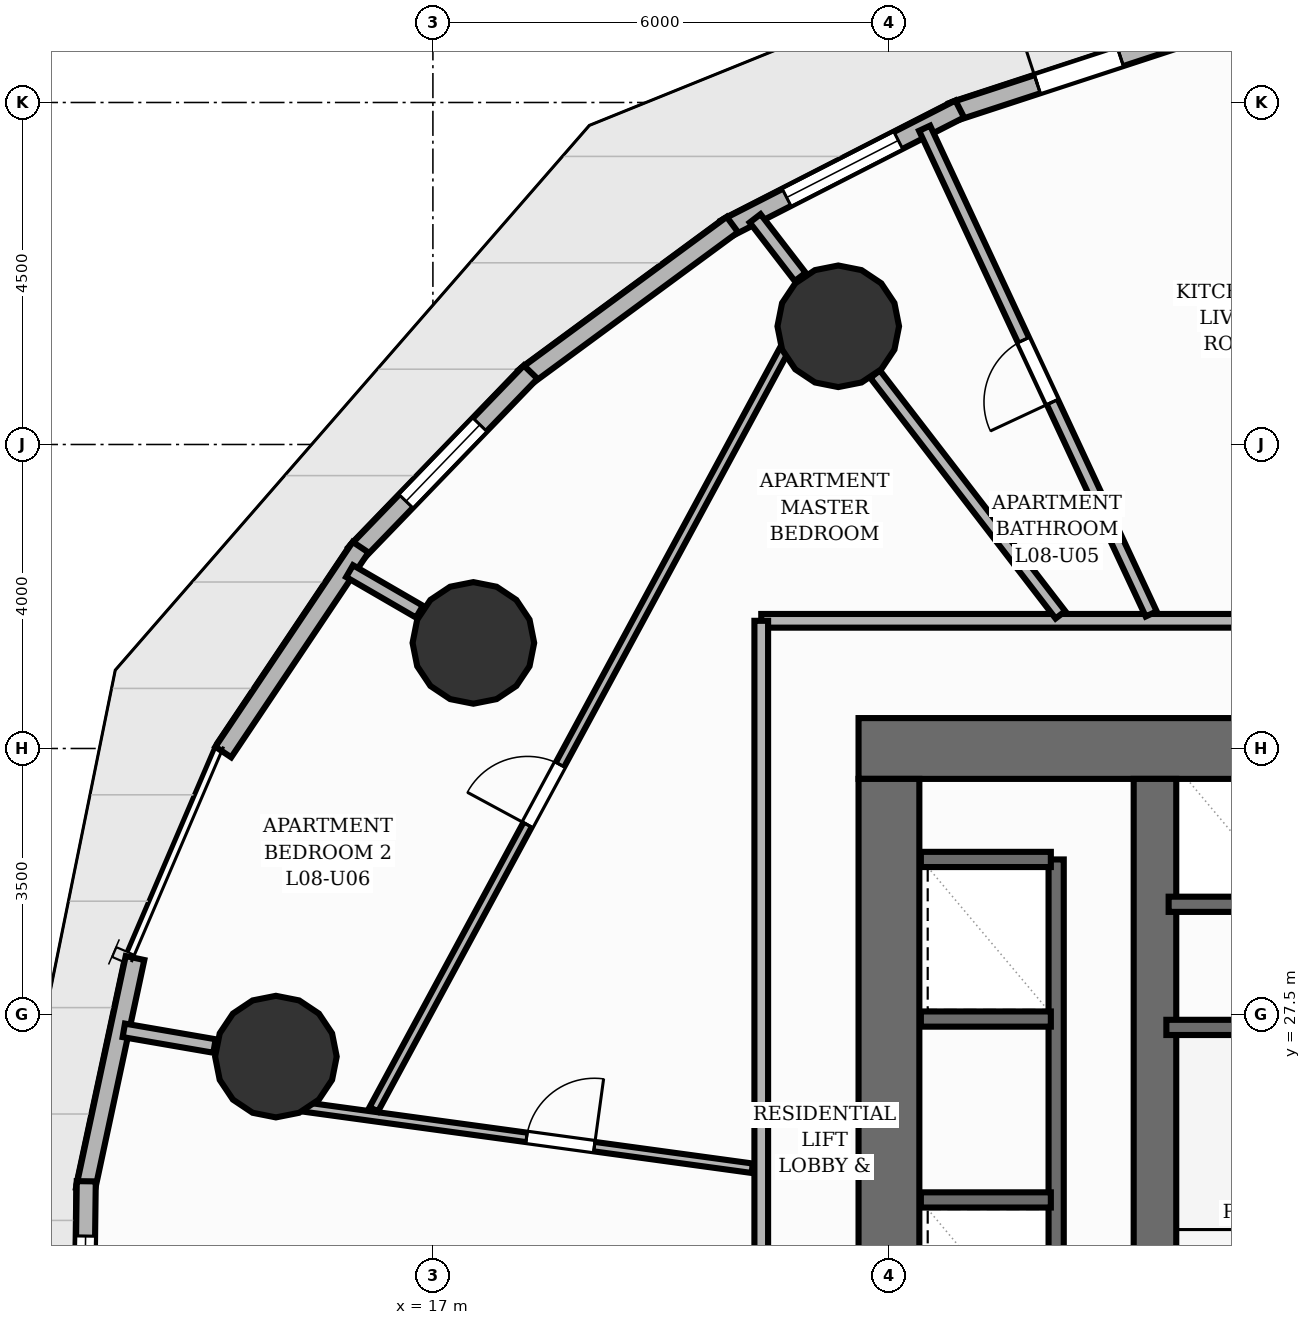
"""IFC4 building model, lengths in metres.
Left out: names, types, materials, properties, quantities, classifications, styles, units other than length and angle.
Written with IfcOpenShell. Run it as: python <this file> out.ifc"""

import sys

from ifc_helpers import new_model, si_unit, direction, frame, frame_2d, origin, origin_2d, place, context, subcontext, project, spatial, rectangle, circle, extrude, element, fill, save


model = new_model("IFC4")
c1 = context("Model", 3, precision=1e-05, world=origin(), true_north=direction((0.0, 1.0)))
c2 = subcontext(c1, "Body", "Model", "MODEL_VIEW")
j1 = project(units=[si_unit("LENGTHUNIT", "METRE"), si_unit("PLANEANGLEUNIT", "RADIAN")], contexts=[c1])
p1 = place(None, origin())
s1 = spatial("IfcSite", under=j1, at=p1, CompositionType="ELEMENT")
p2 = place(p1, origin())
s2 = spatial("IfcBuilding", under=s1, at=p2, CompositionType="ELEMENT")
p3 = place(p2, frame((0.0, 0.0, 31.2)))
s3 = spatial("IfcBuildingStorey", under=s2, at=p3, CompositionType="ELEMENT", Elevation=31.2)
p4 = place(p3, frame((22.6, 31.0, 0.0), z_axis=(0.0, 0.0, 1.0), x_axis=(1.0, 0.0, 0.0)))
e1 = element("IfcWall", 1, at=p4, inside=s3, PredefinedType="SHEAR", context=c2, shape_type="SweptSolid", body=[
    extrude(rectangle(XDim=18.8, YDim=0.8, at=frame_2d((9.4, 0.0))), origin(), (0.0, 0.0, 1.0), 3.2),
])
p5 = place(p4, frame((11.8, 0.0, 0.0)))
e2 = element("IfcOpeningElement", 2, at=p5, cuts=e1, PredefinedType="OPENING", context=c2, shape_type="SweptSolid", body=[
    extrude(rectangle(XDim=1.1, YDim=2.15, at=frame_2d((0.55, 1.075))), frame((0.0, 0.41, 0.0), z_axis=(0.0, -1.0, 0.0), x_axis=(1.0, 0.0, 0.0)), (0.0, 0.0, 1.0), 0.82),
])
p6 = place(p3, frame((23.0, 17.4, 0.0), z_axis=(0.0, 0.0, 1.0), x_axis=(0.0, 1.0, 0.0)))
e3 = element("IfcWall", 3, at=p6, inside=s3, PredefinedType="SHEAR", context=c2, shape_type="SweptSolid", body=[
    extrude(rectangle(XDim=13.2, YDim=0.8, at=frame_2d((6.6, 0.0))), origin(), (0.0, 0.0, 1.0), 3.2),
])
p7 = place(p3, frame((26.5, 17.4, 0.0), z_axis=(0.0, 0.0, 1.0), x_axis=(0.0, 1.0, 0.0)))
e4 = element("IfcWall", 4, at=p7, inside=s3, PredefinedType="SHEAR", context=c2, shape_type="SweptSolid", body=[
    extrude(rectangle(XDim=13.2, YDim=0.56, at=frame_2d((6.6, 0.0))), origin(), (0.0, 0.0, 1.0), 3.2),
])
for number, where, z_axis, x_axis in (
    (5, (22.333, 36.555, 0.0), (0.0, 0.0, 1.0), (1.0, 0.0, 0.0)),
    (6, (17.532, 32.389, 0.0), (0.0, 0.0, 1.0), (1.0, 0.0, 0.0)),
    (7, (14.934, 26.946, 0.0), (0.0, 0.0, 1.0), (1.0, 0.0, 0.0)),
):
    element("IfcColumn", number, at=place(p3, frame(where, z_axis=z_axis, x_axis=x_axis)), inside=s3, PredefinedType="COLUMN", context=c2, shape_type="SweptSolid", body=[
        extrude(circle(Radius=0.8, at=origin_2d()), origin(), (0.0, 0.0, 1.0), 3.2),
    ])
p8 = place(p3, frame((23.831, 39.373, 0.0), z_axis=(0.0, 0.0, 1.0), x_axis=(0.950290237418, 0.311365484066, 0.0)))
e8 = element("IfcWall", 8, at=p8, inside=s3, PredefinedType="SOLIDWALL", context=c2, shape_type="SweptSolid", body=[
    extrude(rectangle(XDim=3.513, YDim=0.25, at=frame_2d((1.756, 0.0))), origin(), (0.0, 0.0, 1.0), 2.96),
])
p9 = place(p8, frame((1.181, 0.0, 0.0)))
e9 = element("IfcOpeningElement", 9, at=p9, cuts=e8, PredefinedType="OPENING", context=c2, shape_type="SweptSolid", body=[
    extrude(rectangle(XDim=1.15, YDim=2.2, at=frame_2d((0.575, 1.1))), frame((0.0, 0.135, 0.0), z_axis=(0.0, -1.0, 0.0), x_axis=(1.0, 0.0, 0.0)), (0.0, 0.0, 1.0), 0.27),
])
p10 = place(p3, frame((20.847, 37.836, 0.0), z_axis=(0.0, 0.0, 1.0), x_axis=(0.890260122421, 0.455452428281, 0.0)))
e10 = element("IfcWall", 10, at=p10, inside=s3, PredefinedType="SOLIDWALL", context=c2, shape_type="SweptSolid", body=[
    extrude(rectangle(XDim=3.465, YDim=0.25, at=frame_2d((1.732, 0.0))), origin(), (0.0, 0.0, 1.0), 2.96),
])
p11 = place(p10, frame((0.907, 0.0, 0.85)))
e11 = element("IfcOpeningElement", 11, at=p11, cuts=e10, PredefinedType="OPENING", context=c2, shape_type="SweptSolid", body=[
    extrude(rectangle(XDim=1.65, YDim=1.55, at=frame_2d((0.825, 0.775))), frame((0.0, 0.135, 0.0), z_axis=(0.0, -1.0, 0.0), x_axis=(1.0, 0.0, 0.0)), (0.0, 0.0, 1.0), 0.27),
])
p12 = place(p3, frame((18.202, 35.88, 0.0), z_axis=(0.0, 0.0, 1.0), x_axis=(0.805405938507, 0.592723606935, 0.0)))
e12 = element("IfcWall", 12, at=p12, inside=s3, PredefinedType="SOLIDWALL", context=c2, shape_type="SweptSolid", body=[
    extrude(rectangle(XDim=3.399, YDim=0.25, at=frame_2d((1.699, 0.0))), origin(), (0.0, 0.0, 1.0), 2.96),
])
p13 = place(p3, frame((15.979, 33.562, 0.0), z_axis=(0.0, 0.0, 1.0), x_axis=(0.694392538781, 0.719596416115, 0.0)))
e13 = element("IfcWall", 13, at=p13, inside=s3, PredefinedType="SOLIDWALL", context=c2, shape_type="SweptSolid", body=[
    extrude(rectangle(XDim=3.323, YDim=0.25, at=frame_2d((1.661, 0.0))), origin(), (0.0, 0.0, 1.0), 2.96),
])
p14 = place(p13, frame((0.961, 0.0, 0.85)))
e14 = element("IfcOpeningElement", 14, at=p14, cuts=e13, PredefinedType="OPENING", context=c2, shape_type="SweptSolid", body=[
    extrude(rectangle(XDim=1.4, YDim=1.55, at=frame_2d((0.7, 0.775))), frame((0.0, 0.135, 0.0), z_axis=(0.0, -1.0, 0.0), x_axis=(1.0, 0.0, 0.0)), (0.0, 0.0, 1.0), 0.27),
])
p15 = place(p3, frame((14.242, 30.953, 0.0), z_axis=(0.0, 0.0, 1.0), x_axis=(0.556764929833, 0.83067009872, 0.0)))
e15 = element("IfcWall", 15, at=p15, inside=s3, PredefinedType="SOLIDWALL", context=c2, shape_type="SweptSolid", body=[
    extrude(rectangle(XDim=3.244, YDim=0.25, at=frame_2d((1.622, 0.0))), origin(), (0.0, 0.0, 1.0), 2.96),
])
p16 = place(p3, frame((12.427, 25.192, 0.0), z_axis=(0.0, 0.0, 1.0), x_axis=(0.209668000253, 0.977772637002, 0.0)))
e16 = element("IfcWall", 16, at=p16, inside=s3, PredefinedType="SOLIDWALL", context=c2, shape_type="SweptSolid", body=[
    extrude(rectangle(XDim=3.121, YDim=0.25, at=frame_2d((1.56, 0.0))), origin(), (0.0, 0.0, 1.0), 2.96),
])
p17 = place(p3, frame((12.401, 22.214, 0.0), z_axis=(0.0, 0.0, 1.0), x_axis=(0.012397373015, 0.999923149618, 0.0)))
e17 = element("IfcWall", 17, at=p17, inside=s3, PredefinedType="SOLIDWALL", context=c2, shape_type="SweptSolid", body=[
    extrude(rectangle(XDim=3.092, YDim=0.25, at=frame_2d((1.546, 0.0))), origin(), (0.0, 0.0, 1.0), 2.96),
])
p18 = place(p17, frame((0.721, 0.0, 0.85)))
e18 = element("IfcOpeningElement", 18, at=p18, cuts=e17, PredefinedType="OPENING", context=c2, shape_type="SweptSolid", body=[
    extrude(rectangle(XDim=1.65, YDim=1.55, at=frame_2d((0.825, 0.775))), frame((0.0, 0.135, 0.0), z_axis=(0.0, -1.0, 0.0), x_axis=(1.0, 0.0, 0.0)), (0.0, 0.0, 1.0), 0.27),
])
p19 = place(p3, frame((26.65, 27.33, 0.0), z_axis=(0.0, 0.0, 1.0), x_axis=(1.0, 0.0, 0.0)))
e19 = element("IfcWall", 19, at=p19, inside=s3, PredefinedType="SHEAR", context=c2, shape_type="SweptSolid", body=[
    extrude(rectangle(XDim=3.24, YDim=0.2, at=frame_2d((1.62, 0.0))), origin(), (0.0, 0.0, 1.0), 3.2),
])
p20 = place(p3, frame((25.2, 18.46, 0.0), z_axis=(0.0, 0.0, 1.0), x_axis=(0.0, 1.0, 0.0)))
e20 = element("IfcWall", 20, at=p20, inside=s3, PredefinedType="SHEAR", context=c2, shape_type="SweptSolid", body=[
    extrude(rectangle(XDim=11.08, YDim=0.2, at=frame_2d((5.54, 0.0))), origin(), (0.0, 0.0, 1.0), 3.2),
])
for number, where, z_axis, x_axis in (
    (21, (23.42, 29.54, 0.0), (0.0, 0.0, 1.0), (1.0, 0.0, 0.0)),
    (22, (23.42, 25.06, 0.0), (0.0, 0.0, 1.0), (1.0, 0.0, 0.0)),
    (23, (23.42, 27.44, 0.0), (0.0, 0.0, 1.0), (1.0, 0.0, 0.0)),
):
    element("IfcWall", number, at=place(p3, frame(where, z_axis=z_axis, x_axis=x_axis)), inside=s3, PredefinedType="SHEAR", context=c2, shape_type="SweptSolid", body=[
        extrude(rectangle(XDim=1.71, YDim=0.2, at=frame_2d((0.855, 0.0))), origin(), (0.0, 0.0, 1.0), 3.2),
    ])
p21 = place(p3, frame((26.68, 28.95, 0.0), z_axis=(0.0, 0.0, 1.0), x_axis=(1.0, 0.0, 0.0)))
e24 = element("IfcWall", 24, at=p21, inside=s3, PredefinedType="SHEAR", context=c2, shape_type="SweptSolid", body=[
    extrude(rectangle(XDim=5.24, YDim=0.2, at=frame_2d((2.62, 0.0))), origin(), (0.0, 0.0, 1.0), 3.2),
])
p22 = place(p3, frame((21.833, 37.205, 0.0), z_axis=(0.0, 0.0, 1.0), x_axis=(-0.609953343804, 0.792437327732, 0.0)))
e25 = element("IfcWall", 25, at=p22, inside=s3, PredefinedType="PARTITIONING", context=c2, shape_type="SweptSolid", body=[
    extrude(rectangle(XDim=0.973, YDim=0.18, at=frame_2d((0.486, 0.0))), origin(), (0.0, 0.0, 1.0), 2.178),
])
p23 = place(p3, frame((16.823, 32.8, 0.0), z_axis=(0.0, 0.0, 1.0), x_axis=(-0.865001274409, 0.501769663562, 0.0)))
e26 = element("IfcWall", 26, at=p23, inside=s3, PredefinedType="PARTITIONING", context=c2, shape_type="SweptSolid", body=[
    extrude(rectangle(XDim=1.063, YDim=0.18, at=frame_2d((0.531, 0.0))), origin(), (0.0, 0.0, 1.0), 2.178),
])
p24 = place(p3, frame((14.126, 27.085, 0.0), z_axis=(0.0, 0.0, 1.0), x_axis=(-0.985412344637, 0.170183756676, 0.0)))
e27 = element("IfcWall", 27, at=p24, inside=s3, PredefinedType="PARTITIONING", context=c2, shape_type="SweptSolid", body=[
    extrude(rectangle(XDim=1.211, YDim=0.18, at=frame_2d((0.605, 0.0))), origin(), (0.0, 0.0, 1.0), 2.178),
])
p25 = place(p3, frame((21.32, 32.68, 0.0), z_axis=(0.0, 0.0, 1.0), x_axis=(1.0, 0.0, 0.0)))
e28 = element("IfcWall", 28, at=p25, inside=s3, PredefinedType="PARTITIONING", context=c2, shape_type="SweptSolid", body=[
    extrude(rectangle(XDim=8.823, YDim=0.18, at=frame_2d((4.411, 0.0))), origin(), (0.0, 0.0, 1.0), 2.955),
])
p26 = place(p25, frame((6.462, 0.0, 0.0)))
e29 = element("IfcOpeningElement", 29, at=p26, cuts=e28, PredefinedType="OPENING", context=c2, shape_type="SweptSolid", body=[
    extrude(rectangle(XDim=1.05, YDim=2.15, at=frame_2d((0.525, 1.075))), frame((0.0, 0.1, 0.0), z_axis=(0.0, -1.0, 0.0), x_axis=(1.0, 0.0, 0.0)), (0.0, 0.0, 1.0), 0.2),
])
p27 = place(p3, frame((21.32, 22.09, 0.0), z_axis=(0.0, 0.0, 1.0), x_axis=(0.0, 1.0, 0.0)))
e30 = element("IfcWall", 30, at=p27, inside=s3, PredefinedType="PARTITIONING", context=c2, shape_type="SweptSolid", body=[
    extrude(rectangle(XDim=10.59, YDim=0.18, at=frame_2d((5.295, 0.0))), origin(), (0.0, 0.0, 1.0), 2.955),
])
p28 = place(p27, frame((1.17, 0.0, 0.0)))
e31 = element("IfcOpeningElement", 31, at=p28, cuts=e30, PredefinedType="OPENING", context=c2, shape_type="SweptSolid", body=[
    extrude(rectangle(XDim=1.05, YDim=2.15, at=frame_2d((0.525, 1.075))), frame((0.0, 0.1, 0.0), z_axis=(0.0, -1.0, 0.0), x_axis=(1.0, 0.0, 0.0)), (0.0, 0.0, 1.0), 0.2),
])
p29 = place(p3, frame((26.45, 32.771, 0.0), z_axis=(0.0, 0.0, 1.0), x_axis=(-0.422745211231, 0.906248578692, 0.0)))
e32 = element("IfcWall", 32, at=p29, inside=s3, PredefinedType="PLUMBINGWALL", context=c2, shape_type="SweptSolid", body=[
    extrude(rectangle(XDim=7.052, YDim=0.16, at=frame_2d((3.526, 0.0))), origin(), (0.0, 0.0, 1.0), 2.641),
])
p30 = place(p29, frame((3.076, 0.0, 0.0)))
e33 = element("IfcOpeningElement", 33, at=p30, cuts=e32, PredefinedType="OPENING", context=c2, shape_type="SweptSolid", body=[
    extrude(rectangle(XDim=0.9, YDim=2.1, at=frame_2d((0.45, 1.05))), frame((0.0, 0.09, 0.0), z_axis=(0.0, -1.0, 0.0), x_axis=(1.0, 0.0, 0.0)), (0.0, 0.0, 1.0), 0.18),
])
p31 = place(p3, frame((25.256, 32.759, 0.0), z_axis=(0.0, 0.0, 1.0), x_axis=(-0.610097434882, 0.792326397358, 0.0)))
e34 = element("IfcWall", 34, at=p31, inside=s3, PredefinedType="PLUMBINGWALL", context=c2, shape_type="SweptSolid", body=[
    extrude(rectangle(XDim=3.997, YDim=0.16, at=frame_2d((1.998, 0.0))), origin(), (0.0, 0.0, 1.0), 2.178),
])
p32 = place(p3, frame((15.33, 26.28, 0.0), z_axis=(0.0, 0.0, 1.0), x_axis=(0.990775681502, -0.135512172681, 0.0)))
e35 = element("IfcWall", 35, at=p32, inside=s3, PredefinedType="PARTITIONING", context=c2, shape_type="SweptSolid", body=[
    extrude(rectangle(XDim=5.926, YDim=0.125, at=frame_2d((2.963, 0.0))), origin(), (0.0, 0.0, 1.0), 2.955),
])
p33 = place(p32, frame((2.929, 0.0, 0.0)))
e36 = element("IfcOpeningElement", 36, at=p33, cuts=e35, PredefinedType="OPENING", context=c2, shape_type="SweptSolid", body=[
    extrude(rectangle(XDim=0.9, YDim=2.1, at=frame_2d((0.45, 1.05))), frame((0.0, 0.073, 0.0), z_axis=(0.0, -1.0, 0.0), x_axis=(1.0, 0.0, 0.0)), (0.0, 0.0, 1.0), 0.145),
])
p34 = place(p3, frame((16.222, 26.252, 0.0), z_axis=(0.0, 0.0, 1.0), x_axis=(0.475374660533, 0.879783457519, 0.0)))
e37 = element("IfcWall", 37, at=p34, inside=s3, PredefinedType="PARTITIONING", context=c2, shape_type="SweptSolid", body=[
    extrude(rectangle(XDim=11.37, YDim=0.125, at=frame_2d((5.685, 0.0))), origin(), (0.0, 0.0, 1.0), 2.328),
])
p35 = place(p34, frame((4.255, 0.0, 0.0)))
e38 = element("IfcOpeningElement", 38, at=p35, cuts=e37, PredefinedType="OPENING", context=c2, shape_type="SweptSolid", body=[
    extrude(rectangle(XDim=0.9, YDim=2.1, at=frame_2d((0.45, 1.05))), frame((0.0, 0.073, 0.0), z_axis=(0.0, -1.0, 0.0), x_axis=(1.0, 0.0, 0.0)), (0.0, 0.0, 1.0), 0.145),
])
p36 = place(p9, origin())
e39 = element("IfcDoor", 39, at=p36, inside=s3, OperationType="SINGLE_SWING_LEFT", PredefinedType="DOOR", context=c2, shape_type="SweptSolid", body=[
    extrude(rectangle(XDim=1.15, YDim=2.2, at=frame_2d((0.575, 1.1))), frame((0.0, 0.025, 0.0), z_axis=(0.0, -1.0, 0.0), x_axis=(1.0, 0.0, 0.0)), (0.0, 0.0, 1.0), 0.05),
])
fill(e9, e39)
p37 = place(p11, origin())
e40 = element("IfcWindow", 40, at=p37, inside=s3, PartitioningType="SINGLE_PANEL", PredefinedType="WINDOW", context=c2, shape_type="SweptSolid", body=[
    extrude(rectangle(XDim=1.65, YDim=1.55, at=frame_2d((0.825, 0.775))), frame((0.0, 0.03, 0.0), z_axis=(0.0, -1.0, 0.0), x_axis=(1.0, 0.0, 0.0)), (0.0, 0.0, 1.0), 0.06),
])
fill(e11, e40)
p38 = place(p14, origin())
e41 = element("IfcWindow", 41, at=p38, inside=s3, PartitioningType="SINGLE_PANEL", PredefinedType="WINDOW", context=c2, shape_type="SweptSolid", body=[
    extrude(rectangle(XDim=1.4, YDim=1.55, at=frame_2d((0.7, 0.775))), frame((0.0, 0.03, 0.0), z_axis=(0.0, -1.0, 0.0), x_axis=(1.0, 0.0, 0.0)), (0.0, 0.0, 1.0), 0.06),
])
fill(e14, e41)
p39 = place(p18, origin())
e42 = element("IfcWindow", 42, at=p39, inside=s3, PartitioningType="SINGLE_PANEL", PredefinedType="WINDOW", context=c2, shape_type="SweptSolid", body=[
    extrude(rectangle(XDim=1.65, YDim=1.55, at=frame_2d((0.825, 0.775))), frame((0.0, 0.03, 0.0), z_axis=(0.0, -1.0, 0.0), x_axis=(1.0, 0.0, 0.0)), (0.0, 0.0, 1.0), 0.06),
])
fill(e18, e42)
p40 = place(p30, origin())
e43 = element("IfcDoor", 43, at=p40, inside=s3, OperationType="SINGLE_SWING_LEFT", PredefinedType="DOOR", context=c2, shape_type="SweptSolid", body=[
    extrude(rectangle(XDim=0.9, YDim=2.1, at=frame_2d((0.45, 1.05))), frame((0.0, 0.025, 0.0), z_axis=(0.0, -1.0, 0.0), x_axis=(1.0, 0.0, 0.0)), (0.0, 0.0, 1.0), 0.05),
])
fill(e33, e43)
p41 = place(p33, origin())
e44 = element("IfcDoor", 44, at=p41, inside=s3, OperationType="SINGLE_SWING_RIGHT", PredefinedType="DOOR", context=c2, shape_type="SweptSolid", body=[
    extrude(rectangle(XDim=0.9, YDim=2.1, at=frame_2d((0.45, 1.05))), frame((0.0, 0.025, 0.0), z_axis=(0.0, -1.0, 0.0), x_axis=(1.0, 0.0, 0.0)), (0.0, 0.0, 1.0), 0.05),
])
fill(e36, e44)
p42 = place(p35, origin())
e45 = element("IfcDoor", 45, at=p42, inside=s3, OperationType="SINGLE_SWING_LEFT", PredefinedType="DOOR", context=c2, shape_type="SweptSolid", body=[
    extrude(rectangle(XDim=0.9, YDim=2.1, at=frame_2d((0.45, 1.05))), frame((0.0, 0.025, 0.0), z_axis=(0.0, -1.0, 0.0), x_axis=(1.0, 0.0, 0.0)), (0.0, 0.0, 1.0), 0.05),
])
fill(e38, e45)
save(model, sys.argv[1])
